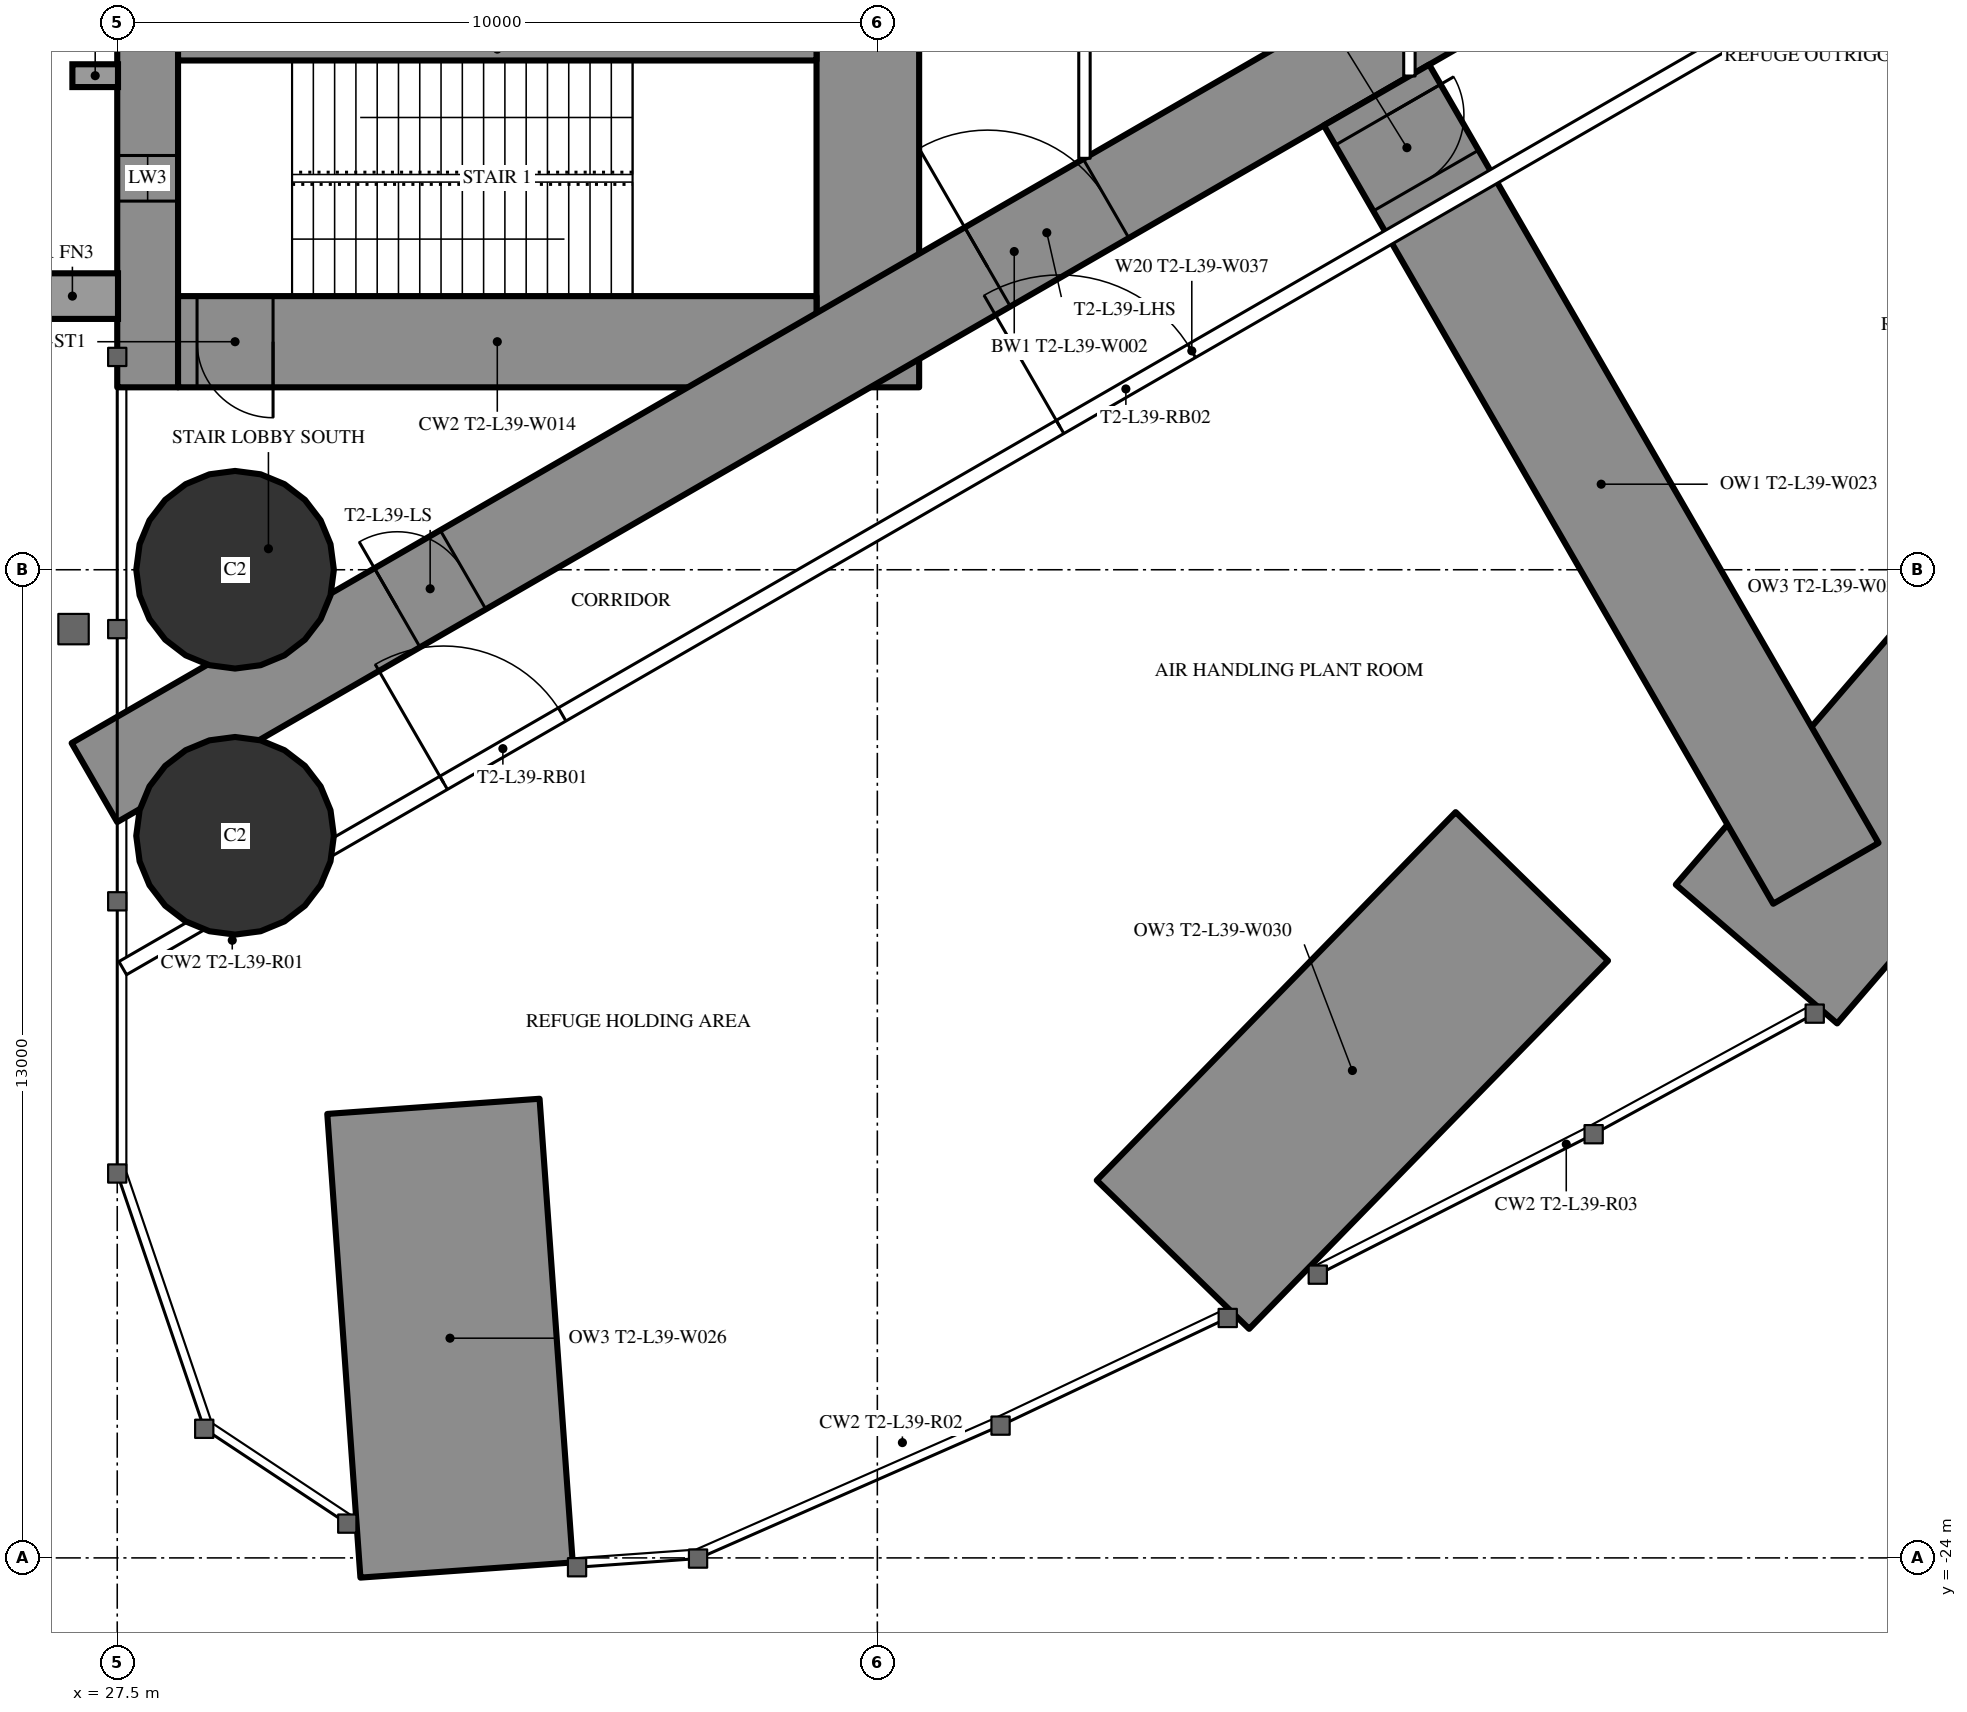
"""IFC4 building model, lengths in metres.
Left out: names, types, materials, properties, quantities, classifications, styles, units other than length and angle.
Written with IfcOpenShell. Run it as: python <this file> out.ifc"""

import sys

from ifc_helpers import new_model, si_unit, direction, frame, frame_2d, origin, origin_2d, place, context, subcontext, project, spatial, rectangle, hollow_circle, extrude, element, fill, save


model = new_model("IFC4")
c1 = context("Model", 3, precision=1e-05, world=origin(), true_north=direction((0.0, 1.0)))
c2 = subcontext(c1, "Body", "Model", "MODEL_VIEW")
j1 = project(units=[si_unit("LENGTHUNIT", "METRE"), si_unit("PLANEANGLEUNIT", "RADIAN")], contexts=[c1])
p1 = place(None, origin())
s1 = spatial("IfcSite", under=j1, at=p1, CompositionType="ELEMENT")
p2 = place(p1, origin())
s2 = spatial("IfcBuilding", under=s1, at=p2, CompositionType="ELEMENT")
p3 = place(p2, frame((0.0, 0.0, 146.7)))
s3 = spatial("IfcBuildingStorey", under=s2, at=p3, CompositionType="ELEMENT", Elevation=146.7)
p4 = place(p3, frame((32.096, -24.16, 0.0), z_axis=(0.0, 0.0, 1.0), x_axis=(-0.071255560652, 0.99745809189, 0.0)))
e1 = element("IfcWall", 1, at=p4, inside=s3, PredefinedType="SHEAR", context=c2, shape_type="SweptSolid", body=[
    extrude(rectangle(XDim=6.116, YDim=2.8, at=frame_2d((3.058, 0.0))), origin(), (0.0, 0.0, 1.0), 6.0),
])
for number, where, z_axis, x_axis in (
    (2, (29.05, -11.0, 0.0), (0.0, 0.0, 1.0), (1.0, 0.0, 0.0)),
    (3, (29.05, -14.5, 0.0), (0.0, 0.0, 1.0), (1.0, 0.0, 0.0)),
):
    element("IfcColumn", number, at=place(p3, frame(where, z_axis=z_axis, x_axis=x_axis)), inside=s3, PredefinedType="COLUMN", context=c2, shape_type="SweptSolid", body=[
        extrude(hollow_circle(Radius=1.3, WallThickness=0.1, at=origin_2d()), origin(), (0.0, 0.0, 1.0), 6.0),
    ])
p5 = place(p3, frame((41.389, -20.01, 0.0), z_axis=(0.0, 0.0, 1.0), x_axis=(0.698062666637, 0.716036670463, 0.0)))
e4 = element("IfcWall", 4, at=p5, inside=s3, PredefinedType="SHEAR", context=c2, shape_type="SweptSolid", body=[
    extrude(rectangle(XDim=6.764, YDim=2.8, at=frame_2d((3.382, 0.0))), origin(), (0.0, 0.0, 1.0), 6.0),
])
p6 = place(p3, frame((49.066, -16.055, 0.0), z_axis=(0.0, 0.0, 1.0), x_axis=(0.652228022196, 0.758022827534, 0.0)))
e5 = element("IfcWall", 5, at=p6, inside=s3, PredefinedType="SHEAR", context=c2, shape_type="SweptSolid", body=[
    extrude(rectangle(XDim=6.81, YDim=2.8, at=frame_2d((3.405, 0.0))), origin(), (0.0, 0.0, 1.0), 6.0),
])
p7 = place(p3, frame((27.9, -8.6, 0.0), z_axis=(0.0, 0.0, 1.0), x_axis=(0.0, 1.0, 0.0)))
e6 = element("IfcWall", 6, at=p7, inside=s3, PredefinedType="SHEAR", context=c2, shape_type="SweptSolid", body=[
    extrude(rectangle(XDim=17.2, YDim=0.8, at=frame_2d((8.6, 0.0))), origin(), (0.0, 0.0, 1.0), 6.0),
])
p8 = place(p7, frame((2.45, 0.0, 0.6)))
e7 = element("IfcOpeningElement", 7, at=p8, cuts=e6, PredefinedType="OPENING", context=c2, shape_type="SweptSolid", body=[
    extrude(rectangle(XDim=0.6, YDim=4.5, at=frame_2d((0.3, 2.25))), frame((0.0, 0.41, 0.0), z_axis=(0.0, -1.0, 0.0), x_axis=(1.0, 0.0, 0.0)), (0.0, 0.0, 1.0), 0.82),
])
p9 = place(p7, frame((14.15, 0.0, 0.6)))
e8 = element("IfcOpeningElement", 8, at=p9, cuts=e6, PredefinedType="OPENING", context=c2, shape_type="SweptSolid", body=[
    extrude(rectangle(XDim=0.6, YDim=4.5, at=frame_2d((0.3, 2.25))), frame((0.0, 0.41, 0.0), z_axis=(0.0, -1.0, 0.0), x_axis=(1.0, 0.0, 0.0)), (0.0, 0.0, 1.0), 0.82),
])
p10 = place(p3, frame((37.375, -8.6, 0.0), z_axis=(0.0, 0.0, 1.0), x_axis=(0.0, 1.0, 0.0)))
e9 = element("IfcWall", 9, at=p10, inside=s3, PredefinedType="SHEAR", context=c2, shape_type="SweptSolid", body=[
    extrude(rectangle(XDim=17.2, YDim=1.35, at=frame_2d((8.6, 0.0))), origin(), (0.0, 0.0, 1.0), 6.0),
])
p11 = place(p10, frame((7.7, 0.0, 0.0)))
e10 = element("IfcOpeningElement", 10, at=p11, cuts=e9, PredefinedType="OPENING", context=c2, shape_type="SweptSolid", body=[
    extrude(rectangle(XDim=1.8, YDim=2.2, at=frame_2d((0.9, 1.1))), frame((0.0, 0.685, 0.0), z_axis=(0.0, -1.0, 0.0), x_axis=(1.0, 0.0, 0.0)), (0.0, 0.0, 1.0), 1.37),
])
p12 = place(p3, frame((28.3, -8.0, 0.0), z_axis=(0.0, 0.0, 1.0), x_axis=(1.0, 0.0, 0.0)))
e11 = element("IfcWall", 11, at=p12, inside=s3, PredefinedType="SHEAR", context=c2, shape_type="SweptSolid", body=[
    extrude(rectangle(XDim=8.4, YDim=1.2, at=frame_2d((4.2, 0.0))), origin(), (0.0, 0.0, 1.0), 6.0),
])
p13 = place(p12, frame((0.25, 0.0, 0.0)))
e12 = element("IfcOpeningElement", 12, at=p13, cuts=e11, PredefinedType="OPENING", context=c2, shape_type="SweptSolid", body=[
    extrude(rectangle(XDim=1.0, YDim=2.2, at=frame_2d((0.5, 1.1))), frame((0.0, 0.61, 0.0), z_axis=(0.0, -1.0, 0.0), x_axis=(1.0, 0.0, 0.0)), (0.0, 0.0, 1.0), 1.22),
])
p14 = place(p3, frame((28.3, -4.15, 0.0), z_axis=(0.0, 0.0, 1.0), x_axis=(1.0, 0.0, 0.0)))
e13 = element("IfcWall", 13, at=p14, inside=s3, PredefinedType="SHEAR", context=c2, shape_type="SweptSolid", body=[
    extrude(rectangle(XDim=8.4, YDim=0.3, at=frame_2d((4.2, 0.0))), origin(), (0.0, 0.0, 1.0), 6.0),
])
p15 = place(p3, frame((27.2, -13.8, 0.0), z_axis=(0.0, 0.0, 1.0), x_axis=(0.866027159892, 0.499996958321, 0.0)))
e14 = element("IfcWall", 14, at=p15, inside=s3, PredefinedType="SHEAR", context=c2, shape_type="SweptSolid", body=[
    extrude(rectangle(XDim=27.947, YDim=1.2, at=frame_2d((13.973, 0.0))), origin(), (0.0, 0.0, 1.0), 6.0),
])
p16 = place(p15, frame((4.6, 0.0, 0.0)))
e15 = element("IfcOpeningElement", 15, at=p16, cuts=e14, PredefinedType="OPENING", context=c2, shape_type="SweptSolid", body=[
    extrude(rectangle(XDim=1.0, YDim=2.2, at=frame_2d((0.5, 1.1))), frame((0.0, 0.61, 0.0), z_axis=(0.0, -1.0, 0.0), x_axis=(1.0, 0.0, 0.0)), (0.0, 0.0, 1.0), 1.22),
])
p17 = place(p15, frame((13.568, 0.0, 0.0)))
e16 = element("IfcOpeningElement", 16, at=p17, cuts=e14, PredefinedType="OPENING", context=c2, shape_type="SweptSolid", body=[
    extrude(rectangle(XDim=1.8, YDim=2.2, at=frame_2d((0.9, 1.1))), frame((0.0, 0.61, 0.0), z_axis=(0.0, -1.0, 0.0), x_axis=(1.0, 0.0, 0.0)), (0.0, 0.0, 1.0), 1.22),
])
p18 = place(p3, frame((44.067, -4.754, 0.0), z_axis=(0.0, 0.0, 1.0), x_axis=(0.499987574995, -0.866032577246, 0.0)))
e17 = element("IfcWall", 17, at=p18, inside=s3, PredefinedType="SHEAR", context=c2, shape_type="SweptSolid", body=[
    extrude(rectangle(XDim=11.824, YDim=1.6, at=frame_2d((5.912, 0.0))), origin(), (0.0, 0.0, 1.0), 6.0),
])
p19 = place(p18, frame((0.3, 0.0, 0.0)))
e18 = element("IfcOpeningElement", 18, at=p19, cuts=e17, PredefinedType="OPENING", context=c2, shape_type="SweptSolid", body=[
    extrude(rectangle(XDim=1.0, YDim=2.2, at=frame_2d((0.5, 1.1))), frame((0.0, 0.81, 0.0), z_axis=(0.0, -1.0, 0.0), x_axis=(1.0, 0.0, 0.0)), (0.0, 0.0, 1.0), 1.62),
])
p20 = place(p3, frame((27.572, -16.241, 0.0), z_axis=(0.0, 0.0, 1.0), x_axis=(0.86602499815, 0.500000702579, 0.0)))
e19 = element("IfcWall", 19, at=p20, inside=s3, PredefinedType="PARTITIONING", context=c2, shape_type="SweptSolid", body=[
    extrude(rectangle(XDim=32.482, YDim=0.2, at=frame_2d((16.241, 0.0))), origin(), (0.0, 0.0, 1.0), 5.75),
])
p21 = place(p20, frame((4.875, 0.0, 0.0)))
e20 = element("IfcOpeningElement", 20, at=p21, cuts=e19, PredefinedType="OPENING", context=c2, shape_type="SweptSolid", body=[
    extrude(rectangle(XDim=1.8, YDim=2.2, at=frame_2d((0.9, 1.1))), frame((0.0, 0.11, 0.0), z_axis=(0.0, -1.0, 0.0), x_axis=(1.0, 0.0, 0.0)), (0.0, 0.0, 1.0), 0.22),
])
p22 = place(p20, frame((14.24, 0.0, 0.0)))
e21 = element("IfcOpeningElement", 21, at=p22, cuts=e19, PredefinedType="OPENING", context=c2, shape_type="SweptSolid", body=[
    extrude(rectangle(XDim=2.0, YDim=2.4, at=frame_2d((1.0, 1.2))), frame((0.0, 0.11, 0.0), z_axis=(0.0, -1.0, 0.0), x_axis=(1.0, 0.0, 0.0)), (0.0, 0.0, 1.0), 0.22),
])
p23 = place(p20, frame((25.029, 0.0, 0.0)))
e22 = element("IfcOpeningElement", 22, at=p23, cuts=e19, PredefinedType="OPENING", context=c2, shape_type="SweptSolid", body=[
    extrude(rectangle(XDim=1.8, YDim=2.2, at=frame_2d((0.9, 1.1))), frame((0.0, 0.11, 0.0), z_axis=(0.0, -1.0, 0.0), x_axis=(1.0, 0.0, 0.0)), (0.0, 0.0, 1.0), 0.22),
])
p24 = place(p3, frame((40.225, -5.587, 0.0), z_axis=(0.0, 0.0, 1.0), x_axis=(0.0, 1.0, 0.0)))
e23 = element("IfcWall", 23, at=p24, inside=s3, PredefinedType="PARTITIONING", context=c2, shape_type="SweptSolid", body=[
    extrude(rectangle(XDim=11.174, YDim=0.15, at=frame_2d((5.587, 0.0))), origin(), (0.0, 0.0, 1.0), 5.75),
])
p25 = place(p24, frame((4.687, 0.0, 0.0)))
e24 = element("IfcOpeningElement", 24, at=p25, cuts=e23, PredefinedType="OPENING", context=c2, shape_type="SweptSolid", body=[
    extrude(rectangle(XDim=1.8, YDim=2.2, at=frame_2d((0.9, 1.1))), frame((0.0, 0.085, 0.0), z_axis=(0.0, -1.0, 0.0), x_axis=(1.0, 0.0, 0.0)), (0.0, 0.0, 1.0), 0.17),
])
p26 = place(p3, frame((44.5, -4.505, 0.0), z_axis=(0.0, 0.0, 1.0), x_axis=(0.0, 1.0, 0.0)))
e25 = element("IfcWall", 25, at=p26, inside=s3, PredefinedType="PARTITIONING", context=c2, shape_type="SweptSolid", body=[
    extrude(rectangle(XDim=9.009, YDim=0.15, at=frame_2d((4.505, 0.0))), origin(), (0.0, 0.0, 1.0), 5.75),
])
p27 = place(p26, frame((4.005, 0.0, 0.0)))
e26 = element("IfcOpeningElement", 26, at=p27, cuts=e25, PredefinedType="OPENING", context=c2, shape_type="SweptSolid", body=[
    extrude(rectangle(XDim=1.0, YDim=2.2, at=frame_2d((0.5, 1.1))), frame((0.0, 0.085, 0.0), z_axis=(0.0, -1.0, 0.0), x_axis=(1.0, 0.0, 0.0)), (0.0, 0.0, 1.0), 0.17),
])
p28 = place(p19, origin())
e27 = element("IfcDoor", 27, at=p28, inside=s3, OperationType="SINGLE_SWING_LEFT", PredefinedType="DOOR", context=c2, shape_type="SweptSolid", body=[
    extrude(rectangle(XDim=1.0, YDim=2.2, at=frame_2d((0.5, 1.1))), frame((0.0, 0.025, 0.0), z_axis=(0.0, -1.0, 0.0), x_axis=(1.0, 0.0, 0.0)), (0.0, 0.0, 1.0), 0.05),
])
fill(e18, e27)
p29 = place(p21, origin())
e28 = element("IfcDoor", 28, at=p29, inside=s3, OperationType="DOUBLE_DOOR_SINGLE_SWING", PredefinedType="DOOR", context=c2, shape_type="SweptSolid", body=[
    extrude(rectangle(XDim=1.8, YDim=2.2, at=frame_2d((0.9, 1.1))), frame((0.0, 0.025, 0.0), z_axis=(0.0, -1.0, 0.0), x_axis=(1.0, 0.0, 0.0)), (0.0, 0.0, 1.0), 0.05),
])
fill(e20, e28)
p30 = place(p22, origin())
e29 = element("IfcDoor", 29, at=p30, inside=s3, OperationType="DOUBLE_DOOR_SINGLE_SWING", PredefinedType="DOOR", context=c2, shape_type="SweptSolid", body=[
    extrude(rectangle(XDim=2.0, YDim=2.4, at=frame_2d((1.0, 1.2))), frame((0.0, 0.025, 0.0), z_axis=(0.0, -1.0, 0.0), x_axis=(1.0, 0.0, 0.0)), (0.0, 0.0, 1.0), 0.05),
])
fill(e21, e29)
p31 = place(p16, origin())
e30 = element("IfcDoor", 30, at=p31, inside=s3, OperationType="SINGLE_SWING_LEFT", PredefinedType="DOOR", context=c2, shape_type="SweptSolid", body=[
    extrude(rectangle(XDim=1.0, YDim=2.2, at=frame_2d((0.5, 1.1))), frame((0.0, 0.025, 0.0), z_axis=(0.0, -1.0, 0.0), x_axis=(1.0, 0.0, 0.0)), (0.0, 0.0, 1.0), 0.05),
])
fill(e15, e30)
p32 = place(p17, origin())
e31 = element("IfcDoor", 31, at=p32, inside=s3, OperationType="DOUBLE_DOOR_SINGLE_SWING", PredefinedType="DOOR", context=c2, shape_type="SweptSolid", body=[
    extrude(rectangle(XDim=1.8, YDim=2.2, at=frame_2d((0.9, 1.1))), frame((0.0, 0.025, 0.0), z_axis=(0.0, -1.0, 0.0), x_axis=(1.0, 0.0, 0.0)), (0.0, 0.0, 1.0), 0.05),
])
fill(e16, e31)
p33 = place(p13, origin())
e32 = element("IfcDoor", 32, at=p33, inside=s3, OperationType="SINGLE_SWING_RIGHT", PredefinedType="DOOR", context=c2, shape_type="SweptSolid", body=[
    extrude(rectangle(XDim=1.0, YDim=2.2, at=frame_2d((0.5, 1.1))), frame((0.0, 0.025, 0.0), z_axis=(0.0, -1.0, 0.0), x_axis=(1.0, 0.0, 0.0)), (0.0, 0.0, 1.0), 0.05),
])
fill(e12, e32)
p34 = place(p8, origin())
e33 = element("IfcWindow", 33, at=p34, inside=s3, PartitioningType="SINGLE_PANEL", PredefinedType="WINDOW", context=c2, shape_type="SweptSolid", body=[
    extrude(rectangle(XDim=0.6, YDim=4.5, at=frame_2d((0.3, 2.25))), frame((0.0, 0.03, 0.0), z_axis=(0.0, -1.0, 0.0), x_axis=(1.0, 0.0, 0.0)), (0.0, 0.0, 1.0), 0.06),
])
fill(e7, e33)
save(model, sys.argv[1])
